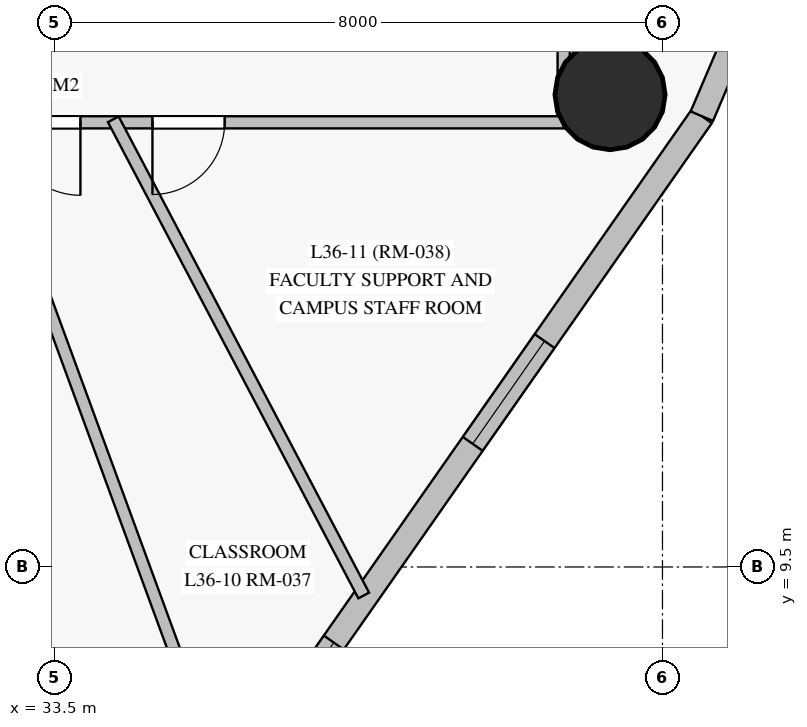
"""IFC4 building model, lengths in metres.
Left out: names, types, materials, properties, quantities, classifications, styles, units other than length and angle.
Written with IfcOpenShell. Run it as: python <this file> out.ifc"""

import sys

from ifc_helpers import new_model, si_unit, direction, frame, frame_2d, origin, origin_with_axes, origin_2d, place, context, subcontext, project, spatial, rectangle, circle, extrude, source, transform, mapped, element, fill, save


model = new_model("IFC4")
c1 = context("Model", 3, precision=1e-05, world=origin(), true_north=direction((0.0, 1.0)))
c2 = subcontext(c1, "Body", "Model", "MODEL_VIEW")
j1 = project(units=[si_unit("LENGTHUNIT", "METRE"), si_unit("PLANEANGLEUNIT", "RADIAN")], contexts=[c1])
p1 = place(None, origin())
s1 = spatial("IfcSite", under=j1, at=p1, CompositionType="ELEMENT")
p2 = place(p1, origin())
s2 = spatial("IfcBuilding", under=s1, at=p2, CompositionType="ELEMENT")
p3 = place(p2, frame((0.0, 0.0, 129.75)))
s3 = spatial("IfcBuildingStorey", under=s2, at=p3, CompositionType="ELEMENT", Elevation=129.75)
m1 = source(origin_with_axes(), c2, "Body", "SweptSolid", [
    extrude(circle(Radius=0.725, at=origin_2d()), origin(), (0.0, 0.0, 1.0), 3.05),
])
p4 = place(p3, frame((40.81, 15.714, 0.0), z_axis=(0.0, 0.0, 1.0), x_axis=(1.0, 0.0, 0.0)))
e1 = element("IfcColumn", 1, at=p4, inside=s3, PredefinedType="COLUMN", context=c2, shape_type="MappedRepresentation", body=[
    mapped(m1, transform((0.0, 0.0, 0.0), scale=1.0)),
])
p5 = place(p3, frame((33.945, 3.886, 0.0), z_axis=(0.0, 0.0, 1.0), x_axis=(0.573079618635, 0.819499695366, 0.0)))
e2 = element("IfcWall", 2, at=p5, inside=s3, PredefinedType="SOLIDWALL", context=c2, shape_type="SweptSolid", body=[
    extrude(rectangle(XDim=14.087, YDim=0.32, at=frame_2d((7.044, 0.0))), origin(), (0.0, 0.0, 1.0), 2.825),
])
p6 = place(p5, frame((0.824, 0.0, 0.85)))
e3 = element("IfcOpeningElement", 3, at=p6, cuts=e2, PredefinedType="OPENING", context=c2, shape_type="SweptSolid", body=[
    extrude(rectangle(XDim=1.65, YDim=1.65, at=frame_2d((0.825, 0.825))), frame((0.0, 0.17, 0.0), z_axis=(0.0, -1.0, 0.0), x_axis=(1.0, 0.0, 0.0)), (0.0, 0.0, 1.0), 0.34),
])
p7 = place(p5, frame((3.988, 0.0, 0.85)))
e4 = element("IfcOpeningElement", 4, at=p7, cuts=e2, PredefinedType="OPENING", context=c2, shape_type="SweptSolid", body=[
    extrude(rectangle(XDim=1.65, YDim=1.65, at=frame_2d((0.825, 0.825))), frame((0.0, 0.17, 0.0), z_axis=(0.0, -1.0, 0.0), x_axis=(1.0, 0.0, 0.0)), (0.0, 0.0, 1.0), 0.34),
])
p8 = place(p5, frame((8.827, 0.0, 0.85)))
e5 = element("IfcOpeningElement", 5, at=p8, cuts=e2, PredefinedType="OPENING", context=c2, shape_type="SweptSolid", body=[
    extrude(rectangle(XDim=1.65, YDim=1.65, at=frame_2d((0.825, 0.825))), frame((0.0, 0.17, 0.0), z_axis=(0.0, -1.0, 0.0), x_axis=(1.0, 0.0, 0.0)), (0.0, 0.0, 1.0), 0.34),
])
p9 = place(p3, frame((42.018, 15.431, 0.0), z_axis=(0.0, 0.0, 1.0), x_axis=(0.391384023763, 0.920227442507, 0.0)))
e6 = element("IfcWall", 6, at=p9, inside=s3, PredefinedType="SOLIDWALL", context=c2, shape_type="SweptSolid", body=[
    extrude(rectangle(XDim=9.792, YDim=0.32, at=frame_2d((4.896, 0.0))), origin(), (0.0, 0.0, 1.0), 2.825),
])
p10 = place(p9, frame((1.128, 0.0, 0.85)))
e7 = element("IfcOpeningElement", 7, at=p10, cuts=e6, PredefinedType="OPENING", context=c2, shape_type="SweptSolid", body=[
    extrude(rectangle(XDim=0.95, YDim=1.5, at=frame_2d((0.475, 0.75))), frame((0.0, 0.17, 0.0), z_axis=(0.0, -1.0, 0.0), x_axis=(1.0, 0.0, 0.0)), (0.0, 0.0, 1.0), 0.34),
])
p11 = place(p3, frame((40.2, 37.65, 0.0), z_axis=(0.0, 0.0, 1.0), x_axis=(0.0, -1.0, 0.0)))
e8 = element("IfcWall", 8, at=p11, inside=s3, PredefinedType="PARTITIONING", context=c2, shape_type="SweptSolid", body=[
    extrude(rectangle(XDim=22.3, YDim=0.16, at=frame_2d((11.15, 0.0))), origin(), (0.0, 0.0, 1.0), 2.325),
])
p12 = place(p11, frame((14.02, 0.0, 0.0)))
e9 = element("IfcOpeningElement", 9, at=p12, cuts=e8, PredefinedType="OPENING", context=c2, shape_type="SweptSolid", body=[
    extrude(rectangle(XDim=0.95, YDim=2.15, at=frame_2d((0.475, 1.075))), frame((0.0, 0.09, 0.0), z_axis=(0.0, -1.0, 0.0), x_axis=(1.0, 0.0, 0.0)), (0.0, 0.0, 1.0), 0.18),
])
p13 = place(p11, frame((10.185, 0.0, 0.0)))
e10 = element("IfcOpeningElement", 10, at=p13, cuts=e8, PredefinedType="OPENING", context=c2, shape_type="SweptSolid", body=[
    extrude(rectangle(XDim=0.96, YDim=2.15, at=frame_2d((0.48, 1.075))), frame((0.0, 0.09, 0.0), z_axis=(0.0, -1.0, 0.0), x_axis=(1.0, 0.0, 0.0)), (0.0, 0.0, 1.0), 0.18),
])
p14 = place(p11, frame((7.33, 0.0, 0.0)))
e11 = element("IfcOpeningElement", 11, at=p14, cuts=e8, PredefinedType="OPENING", context=c2, shape_type="SweptSolid", body=[
    extrude(rectangle(XDim=0.95, YDim=2.15, at=frame_2d((0.475, 1.075))), frame((0.0, 0.09, 0.0), z_axis=(0.0, -1.0, 0.0), x_axis=(1.0, 0.0, 0.0)), (0.0, 0.0, 1.0), 0.18),
])
p15 = place(p11, frame((5.1, 0.0, 0.0)))
e12 = element("IfcOpeningElement", 12, at=p15, cuts=e8, PredefinedType="OPENING", context=c2, shape_type="SweptSolid", body=[
    extrude(rectangle(XDim=0.95, YDim=2.15, at=frame_2d((0.475, 1.075))), frame((0.0, 0.09, 0.0), z_axis=(0.0, -1.0, 0.0), x_axis=(1.0, 0.0, 0.0)), (0.0, 0.0, 1.0), 0.18),
])
p16 = place(p3, frame((40.2, 15.35, 0.0), z_axis=(0.0, 0.0, 1.0), x_axis=(-1.0, 0.0, 0.0)))
e13 = element("IfcWall", 13, at=p16, inside=s3, PredefinedType="PARTITIONING", context=c2, shape_type="SweptSolid", body=[
    extrude(rectangle(XDim=10.65, YDim=0.16, at=frame_2d((5.325, 0.0))), origin(), (0.0, 0.0, 1.0), 2.225),
])
p17 = place(p16, frame((7.952, 0.0, 0.0)))
e14 = element("IfcOpeningElement", 14, at=p17, cuts=e13, PredefinedType="OPENING", context=c2, shape_type="SweptSolid", body=[
    extrude(rectangle(XDim=0.95, YDim=2.15, at=frame_2d((0.475, 1.075))), frame((0.0, 0.09, 0.0), z_axis=(0.0, -1.0, 0.0), x_axis=(1.0, 0.0, 0.0)), (0.0, 0.0, 1.0), 0.18),
])
p18 = place(p16, frame((6.357, 0.0, 0.0)))
e15 = element("IfcOpeningElement", 15, at=p18, cuts=e13, PredefinedType="OPENING", context=c2, shape_type="SweptSolid", body=[
    extrude(rectangle(XDim=0.96, YDim=2.15, at=frame_2d((0.48, 1.075))), frame((0.0, 0.09, 0.0), z_axis=(0.0, -1.0, 0.0), x_axis=(1.0, 0.0, 0.0)), (0.0, 0.0, 1.0), 0.18),
])
p19 = place(p16, frame((4.46, 0.0, 0.0)))
e16 = element("IfcOpeningElement", 16, at=p19, cuts=e13, PredefinedType="OPENING", context=c2, shape_type="SweptSolid", body=[
    extrude(rectangle(XDim=0.95, YDim=2.15, at=frame_2d((0.475, 1.075))), frame((0.0, 0.09, 0.0), z_axis=(0.0, -1.0, 0.0), x_axis=(1.0, 0.0, 0.0)), (0.0, 0.0, 1.0), 0.18),
])
p20 = place(p3, frame((32.518, 15.378, 0.0), z_axis=(0.0, 0.0, 1.0), x_axis=(0.344526792854, -0.938776485115, 0.0)))
e17 = element("IfcWall", 17, at=p20, inside=s3, PredefinedType="PARTITIONING", context=c2, shape_type="SweptSolid", body=[
    extrude(rectangle(XDim=9.41, YDim=0.16, at=frame_2d((4.705, 0.0))), origin(), (0.0, 0.0, 1.0), 2.825),
])
p21 = place(p3, frame((34.275, 15.39, 0.0), z_axis=(0.0, 0.0, 1.0), x_axis=(0.465427973784, -0.885085759246, 0.0)))
e18 = element("IfcWall", 18, at=p21, inside=s3, PredefinedType="PARTITIONING", context=c2, shape_type="SweptSolid", body=[
    extrude(rectangle(XDim=7.078, YDim=0.16, at=frame_2d((3.539, 0.0))), origin(), (0.0, 0.0, 1.0), 2.825),
])
m2 = source(origin_with_axes(), c2, "Body", "SweptSolid", [
    extrude(rectangle(XDim=1.65, YDim=1.65, at=frame_2d((0.825, 0.825))), frame((0.0, 0.03, 0.0), z_axis=(0.0, -1.0, 0.0), x_axis=(1.0, 0.0, 0.0)), (0.0, 0.0, 1.0), 0.06),
])
p22 = place(p7, origin())
e19 = element("IfcWindow", 19, at=p22, inside=s3, PartitioningType="SINGLE_PANEL", PredefinedType="WINDOW", context=c2, shape_type="MappedRepresentation", body=[
    mapped(m2, transform((0.0, 0.0, 0.0), scale=1.0)),
])
fill(e4, e19)
p23 = place(p8, origin())
e20 = element("IfcWindow", 20, at=p23, inside=s3, PartitioningType="SINGLE_PANEL", PredefinedType="WINDOW", context=c2, shape_type="MappedRepresentation", body=[
    mapped(m2, transform((0.0, 0.0, 0.0), scale=1.0)),
])
fill(e5, e20)
m3 = source(origin_with_axes(), c2, "Body", "SweptSolid", [
    extrude(rectangle(XDim=0.96, YDim=2.15, at=frame_2d((0.48, 1.075))), frame((0.0, 0.025, 0.0), z_axis=(0.0, -1.0, 0.0), x_axis=(1.0, 0.0, 0.0)), (0.0, 0.0, 1.0), 0.05),
])
p24 = place(p18, origin())
e21 = element("IfcDoor", 21, at=p24, inside=s3, OperationType="SINGLE_SWING_LEFT", PredefinedType="DOOR", context=c2, shape_type="MappedRepresentation", body=[
    mapped(m3, transform((0.0, 0.0, 0.0), scale=1.0)),
])
fill(e15, e21)
m4 = source(origin_with_axes(), c2, "Body", "SweptSolid", [
    extrude(rectangle(XDim=0.95, YDim=2.15, at=frame_2d((0.475, 1.075))), frame((0.0, 0.025, 0.0), z_axis=(0.0, -1.0, 0.0), x_axis=(1.0, 0.0, 0.0)), (0.0, 0.0, 1.0), 0.05),
])
p25 = place(p19, origin())
e22 = element("IfcDoor", 22, at=p25, inside=s3, OperationType="SINGLE_SWING_RIGHT", PredefinedType="DOOR", context=c2, shape_type="MappedRepresentation", body=[
    mapped(m4, transform((0.0, 0.0, 0.0), scale=1.0)),
])
fill(e16, e22)
save(model, sys.argv[1])
